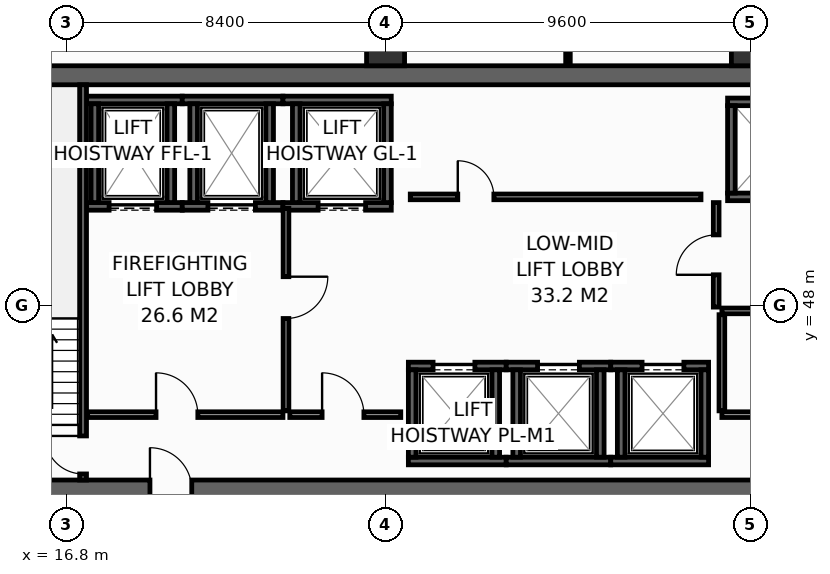
"""IFC4 building model, lengths in metres.
Left out: names, types, materials, properties, quantities, classifications, styles, units other than length and angle.
Written with IfcOpenShell. Run it as: python <this file> out.ifc"""

import sys

from ifc_helpers import new_model, si_unit, direction, frame, frame_2d, origin, origin_2d, place, context, subcontext, project, spatial, rectangle, hollow_rectangle, extrude, element, fill, save


model = new_model("IFC4")
c1 = context("Model", 3, precision=1e-05, world=origin(), true_north=direction((0.0, 1.0)))
c2 = subcontext(c1, "Body", "Model", "MODEL_VIEW")
j1 = project(units=[si_unit("LENGTHUNIT", "METRE"), si_unit("PLANEANGLEUNIT", "RADIAN")], contexts=[c1])
p1 = place(None, origin())
s1 = spatial("IfcSite", under=j1, at=p1, CompositionType="ELEMENT")
p2 = place(p1, origin())
s2 = spatial("IfcBuilding", under=s1, at=p2, CompositionType="ELEMENT")
p3 = place(p2, frame((0.0, 0.0, 129.6)))
s3 = spatial("IfcBuildingStorey", under=s2, at=p3, CompositionType="ELEMENT", Elevation=129.6)
p4 = place(p3, frame((13.6, 43.15, 0.0), z_axis=(0.0, 0.0, 1.0), x_axis=(1.0, 0.0, 0.0)))
e1 = element("IfcWall", 1, at=p4, inside=s3, PredefinedType="SHEAR", context=c2, shape_type="SweptSolid", body=[
    extrude(rectangle(XDim=32.7, YDim=0.5, at=frame_2d((16.35, 0.0))), origin(), (0.0, 0.0, 1.0), 3.55),
])
p5 = place(p4, frame((5.4, 0.0, 0.0)))
e2 = element("IfcOpeningElement", 2, at=p5, cuts=e1, PredefinedType="OPENING", context=c2, shape_type="SweptSolid", body=[
    extrude(rectangle(XDim=1.1, YDim=2.15, at=frame_2d((0.55, 1.075))), frame((0.0, 0.26, 0.0), z_axis=(0.0, -1.0, 0.0), x_axis=(1.0, 0.0, 0.0)), (0.0, 0.0, 1.0), 0.52),
])
p6 = place(p4, frame((25.6, 0.0, 0.0)))
e3 = element("IfcOpeningElement", 3, at=p6, cuts=e1, PredefinedType="OPENING", context=c2, shape_type="SweptSolid", body=[
    extrude(rectangle(XDim=1.1, YDim=2.15, at=frame_2d((0.55, 1.075))), frame((0.0, 0.26, 0.0), z_axis=(0.0, -1.0, 0.0), x_axis=(1.0, 0.0, 0.0)), (0.0, 0.0, 1.0), 0.52),
])
p7 = place(p3, frame((13.6, 54.05, 0.0), z_axis=(0.0, 0.0, 1.0), x_axis=(1.0, 0.0, 0.0)))
e4 = element("IfcWall", 4, at=p7, inside=s3, PredefinedType="SHEAR", context=c2, shape_type="SweptSolid", body=[
    extrude(rectangle(XDim=32.7, YDim=0.5, at=frame_2d((16.35, 0.0))), origin(), (0.0, 0.0, 1.0), 3.55),
])
for number, where, z_axis, x_axis in (
    (5, (25.2, 54.8, 0.0), (0.0, 0.0, 1.0), (1.0, 0.0, 0.0)),
    (6, (34.8, 54.8, 0.0), (0.0, 0.0, 1.0), (1.0, 0.0, 0.0)),
):
    element("IfcColumn", number, at=place(p3, frame(where, z_axis=z_axis, x_axis=x_axis)), inside=s3, PredefinedType="COLUMN", context=c2, shape_type="SweptSolid", body=[
        extrude(hollow_rectangle(XDim=1.0, YDim=1.0, WallThickness=0.045, at=origin_2d()), origin(), (0.0, 0.0, 1.0), 3.8),
    ])
p8 = place(p3, frame((17.33, 50.6, 0.0), z_axis=(0.0, 0.0, 1.0), x_axis=(1.0, 0.0, 0.0)))
e7 = element("IfcWall", 7, at=p8, inside=s3, PredefinedType="SHEAR", context=c2, shape_type="SweptSolid", body=[
    extrude(rectangle(XDim=2.52, YDim=0.2, at=frame_2d((1.26, 0.0))), origin(), (0.0, 0.0, 1.0), 3.55),
])
p9 = place(p8, frame((0.595, 0.0, 0.0)))
e8 = element("IfcOpeningElement", 8, at=p9, cuts=e7, PredefinedType="OPENING", context=c2, shape_type="SweptSolid", body=[
    extrude(rectangle(XDim=1.25, YDim=2.3, at=frame_2d((0.625, 1.15))), frame((0.0, 0.11, 0.0), z_axis=(0.0, -1.0, 0.0), x_axis=(1.0, 0.0, 0.0)), (0.0, 0.0, 1.0), 0.22),
])
p10 = place(p3, frame((17.33, 53.4, 0.0), z_axis=(0.0, 0.0, 1.0), x_axis=(1.0, 0.0, 0.0)))
e9 = element("IfcWall", 9, at=p10, inside=s3, PredefinedType="SHEAR", context=c2, shape_type="SweptSolid", body=[
    extrude(rectangle(XDim=2.52, YDim=0.2, at=frame_2d((1.26, 0.0))), origin(), (0.0, 0.0, 1.0), 3.55),
])
for number, where, z_axis, x_axis in (
    (10, (17.55, 50.7, 0.0), (0.0, 0.0, 1.0), (0.0, 1.0, 0.0)),
    (11, (19.55, 50.7, 0.0), (0.0, 0.0, 1.0), (0.0, 1.0, 0.0)),
):
    element("IfcWall", number, at=place(p3, frame(where, z_axis=z_axis, x_axis=x_axis)), inside=s3, PredefinedType="SHEAR", context=c2, shape_type="SweptSolid", body=[
        extrude(rectangle(XDim=2.6, YDim=0.2, at=frame_2d((1.3, 0.0))), origin(), (0.0, 0.0, 1.0), 3.55),
    ])
p11 = place(p3, frame((19.85, 50.6, 0.0), z_axis=(0.0, 0.0, 1.0), x_axis=(1.0, 0.0, 0.0)))
e12 = element("IfcWall", 12, at=p11, inside=s3, PredefinedType="SHEAR", context=c2, shape_type="SweptSolid", body=[
    extrude(rectangle(XDim=2.65, YDim=0.2, at=frame_2d((1.325, 0.0))), origin(), (0.0, 0.0, 1.0), 3.55),
])
p12 = place(p11, frame((0.675, 0.0, 0.0)))
e13 = element("IfcOpeningElement", 13, at=p12, cuts=e12, PredefinedType="OPENING", context=c2, shape_type="SweptSolid", body=[
    extrude(rectangle(XDim=1.25, YDim=2.3, at=frame_2d((0.625, 1.15))), frame((0.0, 0.11, 0.0), z_axis=(0.0, -1.0, 0.0), x_axis=(1.0, 0.0, 0.0)), (0.0, 0.0, 1.0), 0.22),
])
p13 = place(p3, frame((19.85, 53.4, 0.0), z_axis=(0.0, 0.0, 1.0), x_axis=(1.0, 0.0, 0.0)))
e14 = element("IfcWall", 14, at=p13, inside=s3, PredefinedType="SHEAR", context=c2, shape_type="SweptSolid", body=[
    extrude(rectangle(XDim=2.65, YDim=0.2, at=frame_2d((1.325, 0.0))), origin(), (0.0, 0.0, 1.0), 3.55),
])
for number, where, z_axis, x_axis in (
    (15, (20.15, 50.7, 0.0), (0.0, 0.0, 1.0), (0.0, 1.0, 0.0)),
    (16, (22.15, 50.7, 0.0), (0.0, 0.0, 1.0), (0.0, 1.0, 0.0)),
):
    element("IfcWall", number, at=place(p3, frame(where, z_axis=z_axis, x_axis=x_axis)), inside=s3, PredefinedType="SHEAR", context=c2, shape_type="SweptSolid", body=[
        extrude(rectangle(XDim=2.6, YDim=0.2, at=frame_2d((1.3, 0.0))), origin(), (0.0, 0.0, 1.0), 3.55),
    ])
p14 = place(p3, frame((22.5, 50.6, 0.0), z_axis=(0.0, 0.0, 1.0), x_axis=(1.0, 0.0, 0.0)))
e17 = element("IfcWall", 17, at=p14, inside=s3, PredefinedType="SHEAR", context=c2, shape_type="SweptSolid", body=[
    extrude(rectangle(XDim=2.85, YDim=0.2, at=frame_2d((1.425, 0.0))), origin(), (0.0, 0.0, 1.0), 3.55),
])
p15 = place(p14, frame((0.925, 0.0, 0.0)))
e18 = element("IfcOpeningElement", 18, at=p15, cuts=e17, PredefinedType="OPENING", context=c2, shape_type="SweptSolid", body=[
    extrude(rectangle(XDim=1.25, YDim=2.3, at=frame_2d((0.625, 1.15))), frame((0.0, 0.11, 0.0), z_axis=(0.0, -1.0, 0.0), x_axis=(1.0, 0.0, 0.0)), (0.0, 0.0, 1.0), 0.22),
])
p16 = place(p3, frame((22.5, 53.4, 0.0), z_axis=(0.0, 0.0, 1.0), x_axis=(1.0, 0.0, 0.0)))
e19 = element("IfcWall", 19, at=p16, inside=s3, PredefinedType="SHEAR", context=c2, shape_type="SweptSolid", body=[
    extrude(rectangle(XDim=2.85, YDim=0.2, at=frame_2d((1.425, 0.0))), origin(), (0.0, 0.0, 1.0), 3.55),
])
for number, where, z_axis, x_axis in (
    (20, (22.85, 50.7, 0.0), (0.0, 0.0, 1.0), (0.0, 1.0, 0.0)),
    (21, (25.25, 50.7, 0.0), (0.0, 0.0, 1.0), (0.0, 1.0, 0.0)),
):
    element("IfcWall", number, at=place(p3, frame(where, z_axis=z_axis, x_axis=x_axis)), inside=s3, PredefinedType="SHEAR", context=c2, shape_type="SweptSolid", body=[
        extrude(rectangle(XDim=2.6, YDim=0.2, at=frame_2d((1.3, 0.0))), origin(), (0.0, 0.0, 1.0), 3.55),
    ])
p17 = place(p3, frame((25.8, 43.9, 0.0), z_axis=(0.0, 0.0, 1.0), x_axis=(1.0, 0.0, 0.0)))
e22 = element("IfcWall", 22, at=p17, inside=s3, PredefinedType="SHEAR", context=c2, shape_type="SweptSolid", body=[
    extrude(rectangle(XDim=2.575, YDim=0.2, at=frame_2d((1.288, 0.0))), origin(), (0.0, 0.0, 1.0), 3.55),
])
p18 = place(p3, frame((25.8, 46.4, 0.0), z_axis=(0.0, 0.0, 1.0), x_axis=(1.0, 0.0, 0.0)))
e23 = element("IfcWall", 23, at=p18, inside=s3, PredefinedType="SHEAR", context=c2, shape_type="SweptSolid", body=[
    extrude(rectangle(XDim=2.575, YDim=0.2, at=frame_2d((1.288, 0.0))), origin(), (0.0, 0.0, 1.0), 3.55),
])
p19 = place(p18, frame((0.65, 0.0, 0.0)))
e24 = element("IfcOpeningElement", 24, at=p19, cuts=e23, PredefinedType="OPENING", context=c2, shape_type="SweptSolid", body=[
    extrude(rectangle(XDim=1.1, YDim=2.2, at=frame_2d((0.55, 1.1))), frame((0.0, 0.11, 0.0), z_axis=(0.0, -1.0, 0.0), x_axis=(1.0, 0.0, 0.0)), (0.0, 0.0, 1.0), 0.22),
])
for number, where, z_axis, x_axis in (
    (25, (25.9, 44.0, 0.0), (0.0, 0.0, 1.0), (0.0, 1.0, 0.0)),
    (26, (28.1, 44.0, 0.0), (0.0, 0.0, 1.0), (0.0, 1.0, 0.0)),
):
    element("IfcWall", number, at=place(p3, frame(where, z_axis=z_axis, x_axis=x_axis)), inside=s3, PredefinedType="SHEAR", context=c2, shape_type="SweptSolid", body=[
        extrude(rectangle(XDim=2.3, YDim=0.2, at=frame_2d((1.15, 0.0))), origin(), (0.0, 0.0, 1.0), 3.55),
    ])
p20 = place(p3, frame((28.375, 43.9, 0.0), z_axis=(0.0, 0.0, 1.0), x_axis=(1.0, 0.0, 0.0)))
e27 = element("IfcWall", 27, at=p20, inside=s3, PredefinedType="SHEAR", context=c2, shape_type="SweptSolid", body=[
    extrude(rectangle(XDim=2.75, YDim=0.2, at=frame_2d((1.375, 0.0))), origin(), (0.0, 0.0, 1.0), 3.55),
])
p21 = place(p3, frame((28.375, 46.4, 0.0), z_axis=(0.0, 0.0, 1.0), x_axis=(1.0, 0.0, 0.0)))
e28 = element("IfcWall", 28, at=p21, inside=s3, PredefinedType="SHEAR", context=c2, shape_type="SweptSolid", body=[
    extrude(rectangle(XDim=2.75, YDim=0.2, at=frame_2d((1.375, 0.0))), origin(), (0.0, 0.0, 1.0), 3.55),
])
p22 = place(p21, frame((0.825, 0.0, 0.0)))
e29 = element("IfcOpeningElement", 29, at=p22, cuts=e28, PredefinedType="OPENING", context=c2, shape_type="SweptSolid", body=[
    extrude(rectangle(XDim=1.1, YDim=2.2, at=frame_2d((0.55, 1.1))), frame((0.0, 0.11, 0.0), z_axis=(0.0, -1.0, 0.0), x_axis=(1.0, 0.0, 0.0)), (0.0, 0.0, 1.0), 0.22),
])
for number, where, z_axis, x_axis in (
    (30, (28.65, 44.0, 0.0), (0.0, 0.0, 1.0), (0.0, 1.0, 0.0)),
    (31, (30.85, 44.0, 0.0), (0.0, 0.0, 1.0), (0.0, 1.0, 0.0)),
):
    element("IfcWall", number, at=place(p3, frame(where, z_axis=z_axis, x_axis=x_axis)), inside=s3, PredefinedType="SHEAR", context=c2, shape_type="SweptSolid", body=[
        extrude(rectangle(XDim=2.3, YDim=0.2, at=frame_2d((1.15, 0.0))), origin(), (0.0, 0.0, 1.0), 3.55),
    ])
p23 = place(p3, frame((31.125, 43.9, 0.0), z_axis=(0.0, 0.0, 1.0), x_axis=(1.0, 0.0, 0.0)))
e32 = element("IfcWall", 32, at=p23, inside=s3, PredefinedType="SHEAR", context=c2, shape_type="SweptSolid", body=[
    extrude(rectangle(XDim=2.575, YDim=0.2, at=frame_2d((1.288, 0.0))), origin(), (0.0, 0.0, 1.0), 3.55),
])
p24 = place(p3, frame((31.125, 46.4, 0.0), z_axis=(0.0, 0.0, 1.0), x_axis=(1.0, 0.0, 0.0)))
e33 = element("IfcWall", 33, at=p24, inside=s3, PredefinedType="SHEAR", context=c2, shape_type="SweptSolid", body=[
    extrude(rectangle(XDim=2.575, YDim=0.2, at=frame_2d((1.288, 0.0))), origin(), (0.0, 0.0, 1.0), 3.55),
])
p25 = place(p24, frame((0.825, 0.0, 0.0)))
e34 = element("IfcOpeningElement", 34, at=p25, cuts=e33, PredefinedType="OPENING", context=c2, shape_type="SweptSolid", body=[
    extrude(rectangle(XDim=1.1, YDim=2.2, at=frame_2d((0.55, 1.1))), frame((0.0, 0.11, 0.0), z_axis=(0.0, -1.0, 0.0), x_axis=(1.0, 0.0, 0.0)), (0.0, 0.0, 1.0), 0.22),
])
for number, where, z_axis, x_axis in (
    (35, (31.4, 44.0, 0.0), (0.0, 0.0, 1.0), (0.0, 1.0, 0.0)),
    (36, (33.6, 44.0, 0.0), (0.0, 0.0, 1.0), (0.0, 1.0, 0.0)),
):
    element("IfcWall", number, at=place(p3, frame(where, z_axis=z_axis, x_axis=x_axis)), inside=s3, PredefinedType="SHEAR", context=c2, shape_type="SweptSolid", body=[
        extrude(rectangle(XDim=2.3, YDim=0.2, at=frame_2d((1.15, 0.0))), origin(), (0.0, 0.0, 1.0), 3.55),
    ])
for number, where, z_axis, x_axis in (
    (37, (34.2, 50.85, 0.0), (0.0, 0.0, 1.0), (1.0, 0.0, 0.0)),
    (38, (34.2, 53.35, 0.0), (0.0, 0.0, 1.0), (1.0, 0.0, 0.0)),
):
    element("IfcWall", number, at=place(p3, frame(where, z_axis=z_axis, x_axis=x_axis)), inside=s3, PredefinedType="SHEAR", context=c2, shape_type="SweptSolid", body=[
        extrude(rectangle(XDim=2.575, YDim=0.2, at=frame_2d((1.288, 0.0))), origin(), (0.0, 0.0, 1.0), 3.55),
    ])
p26 = place(p3, frame((34.3, 50.95, 0.0), z_axis=(0.0, 0.0, 1.0), x_axis=(0.0, 1.0, 0.0)))
e39 = element("IfcWall", 39, at=p26, inside=s3, PredefinedType="SHEAR", context=c2, shape_type="SweptSolid", body=[
    extrude(rectangle(XDim=2.3, YDim=0.2, at=frame_2d((1.15, 0.0))), origin(), (0.0, 0.0, 1.0), 3.55),
])
p27 = place(p3, frame((17.24, 43.4, 0.0), z_axis=(0.0, 0.0, 1.0), x_axis=(0.0, 1.0, 0.0)))
e40 = element("IfcWall", 40, at=p27, inside=s3, PredefinedType="SHEAR", context=c2, shape_type="SweptSolid", body=[
    extrude(rectangle(XDim=10.4, YDim=0.18, at=frame_2d((5.2, 0.0))), origin(), (0.0, 0.0, 1.0), 3.55),
])
p28 = place(p27, frame((0.16, 0.0, 0.0)))
e41 = element("IfcOpeningElement", 41, at=p28, cuts=e40, PredefinedType="OPENING", context=c2, shape_type="SweptSolid", body=[
    extrude(rectangle(XDim=1.0, YDim=2.15, at=frame_2d((0.5, 1.075))), frame((0.0, 0.1, 0.0), z_axis=(0.0, -1.0, 0.0), x_axis=(1.0, 0.0, 0.0)), (0.0, 0.0, 1.0), 0.2),
])
p29 = place(p3, frame((17.36, 45.12, 0.0), z_axis=(0.0, 0.0, 1.0), x_axis=(1.0, 0.0, 0.0)))
e42 = element("IfcWall", 42, at=p29, inside=s3, PredefinedType="PARTITIONING", context=c2, shape_type="SweptSolid", body=[
    extrude(rectangle(XDim=5.14, YDim=0.15, at=frame_2d((2.57, 0.0))), origin(), (0.0, 0.0, 1.0), 3.55),
])
p30 = place(p29, frame((1.8, 0.0, 0.0)))
e43 = element("IfcOpeningElement", 43, at=p30, cuts=e42, PredefinedType="OPENING", context=c2, shape_type="SweptSolid", body=[
    extrude(rectangle(XDim=1.1, YDim=2.15, at=frame_2d((0.55, 1.075))), frame((0.0, 0.085, 0.0), z_axis=(0.0, -1.0, 0.0), x_axis=(1.0, 0.0, 0.0)), (0.0, 0.0, 1.0), 0.17),
])
p31 = place(p3, frame((22.58, 50.55, 0.0), z_axis=(0.0, 0.0, 1.0), x_axis=(0.0, -1.0, 0.0)))
e44 = element("IfcWall", 44, at=p31, inside=s3, PredefinedType="PARTITIONING", context=c2, shape_type="SweptSolid", body=[
    extrude(rectangle(XDim=5.33, YDim=0.15, at=frame_2d((2.665, 0.0))), origin(), (0.0, 0.0, 1.0), 3.55),
])
p32 = place(p31, frame((1.8, 0.0, 0.0)))
e45 = element("IfcOpeningElement", 45, at=p32, cuts=e44, PredefinedType="OPENING", context=c2, shape_type="SweptSolid", body=[
    extrude(rectangle(XDim=1.1, YDim=2.15, at=frame_2d((0.55, 1.075))), frame((0.0, 0.085, 0.0), z_axis=(0.0, -1.0, 0.0), x_axis=(1.0, 0.0, 0.0)), (0.0, 0.0, 1.0), 0.17),
])
p33 = place(p3, frame((22.68, 45.12, 0.0), z_axis=(0.0, 0.0, 1.0), x_axis=(1.0, 0.0, 0.0)))
e46 = element("IfcWall", 46, at=p33, inside=s3, PredefinedType="PARTITIONING", context=c2, shape_type="SweptSolid", body=[
    extrude(rectangle(XDim=2.92, YDim=0.15, at=frame_2d((1.46, 0.0))), origin(), (0.0, 0.0, 1.0), 3.55),
])
p34 = place(p33, frame((0.85, 0.0, 0.0)))
e47 = element("IfcOpeningElement", 47, at=p34, cuts=e46, PredefinedType="OPENING", context=c2, shape_type="SweptSolid", body=[
    extrude(rectangle(XDim=1.1, YDim=2.15, at=frame_2d((0.55, 1.075))), frame((0.0, 0.085, 0.0), z_axis=(0.0, -1.0, 0.0), x_axis=(1.0, 0.0, 0.0)), (0.0, 0.0, 1.0), 0.17),
])
p35 = place(p3, frame((33.9, 47.95, 0.0), z_axis=(0.0, 0.0, 1.0), x_axis=(0.0, 1.0, 0.0)))
e48 = element("IfcWall", 48, at=p35, inside=s3, PredefinedType="PARTITIONING", context=c2, shape_type="SweptSolid", body=[
    extrude(rectangle(XDim=2.75, YDim=0.15, at=frame_2d((1.375, 0.0))), origin(), (0.0, 0.0, 1.0), 3.55),
])
p36 = place(p35, frame((0.85, 0.0, 0.0)))
e49 = element("IfcOpeningElement", 49, at=p36, cuts=e48, PredefinedType="OPENING", context=c2, shape_type="SweptSolid", body=[
    extrude(rectangle(XDim=1.05, YDim=2.15, at=frame_2d((0.525, 1.075))), frame((0.0, 0.085, 0.0), z_axis=(0.0, -1.0, 0.0), x_axis=(1.0, 0.0, 0.0)), (0.0, 0.0, 1.0), 0.17),
])
p37 = place(p3, frame((34.05, 45.12, 0.0), z_axis=(0.0, 0.0, 1.0), x_axis=(1.0, 0.0, 0.0)))
e50 = element("IfcWall", 50, at=p37, inside=s3, PredefinedType="PARTITIONING", context=c2, shape_type="SweptSolid", body=[
    extrude(rectangle(XDim=8.45, YDim=0.15, at=frame_2d((4.225, 0.0))), origin(), (0.0, 0.0, 1.0), 3.55),
])
p38 = place(p37, frame((1.5, 0.0, 0.0)))
e51 = element("IfcOpeningElement", 51, at=p38, cuts=e50, PredefinedType="OPENING", context=c2, shape_type="SweptSolid", body=[
    extrude(rectangle(XDim=0.95, YDim=2.15, at=frame_2d((0.475, 1.075))), frame((0.0, 0.085, 0.0), z_axis=(0.0, -1.0, 0.0), x_axis=(1.0, 0.0, 0.0)), (0.0, 0.0, 1.0), 0.17),
])
p39 = place(p37, frame((5.8, 0.0, 0.0)))
e52 = element("IfcOpeningElement", 52, at=p39, cuts=e50, PredefinedType="OPENING", context=c2, shape_type="SweptSolid", body=[
    extrude(rectangle(XDim=0.95, YDim=2.15, at=frame_2d((0.475, 1.075))), frame((0.0, 0.085, 0.0), z_axis=(0.0, -1.0, 0.0), x_axis=(1.0, 0.0, 0.0)), (0.0, 0.0, 1.0), 0.17),
])
p40 = place(p3, frame((34.05, 47.85, 0.0), z_axis=(0.0, 0.0, 1.0), x_axis=(1.0, 0.0, 0.0)))
e53 = element("IfcWall", 53, at=p40, inside=s3, PredefinedType="PARTITIONING", context=c2, shape_type="SweptSolid", body=[
    extrude(rectangle(XDim=8.45, YDim=0.15, at=frame_2d((4.225, 0.0))), origin(), (0.0, 0.0, 1.0), 3.55),
])
p41 = place(p3, frame((34.05, 45.22, 0.0), z_axis=(0.0, 0.0, 1.0), x_axis=(0.0, 1.0, 0.0)))
e54 = element("IfcWall", 54, at=p41, inside=s3, PredefinedType="PARTITIONING", context=c2, shape_type="SweptSolid", body=[
    extrude(rectangle(XDim=2.53, YDim=0.15, at=frame_2d((1.265, 0.0))), origin(), (0.0, 0.0, 1.0), 3.55),
])
p42 = place(p3, frame((25.85, 50.85, 0.0), z_axis=(0.0, 0.0, 1.0), x_axis=(1.0, 0.0, 0.0)))
e55 = element("IfcWall", 55, at=p42, inside=s3, PredefinedType="PARTITIONING", context=c2, shape_type="SweptSolid", body=[
    extrude(rectangle(XDim=7.65, YDim=0.15, at=frame_2d((3.825, 0.0))), origin(), (0.0, 0.0, 1.0), 3.55),
])
p43 = place(p42, frame((1.25, 0.0, 0.0)))
e56 = element("IfcOpeningElement", 56, at=p43, cuts=e55, PredefinedType="OPENING", context=c2, shape_type="SweptSolid", body=[
    extrude(rectangle(XDim=0.95, YDim=2.15, at=frame_2d((0.475, 1.075))), frame((0.0, 0.085, 0.0), z_axis=(0.0, -1.0, 0.0), x_axis=(1.0, 0.0, 0.0)), (0.0, 0.0, 1.0), 0.17),
])
p44 = place(p3, frame((30.0, 54.32, 0.0), z_axis=(0.0, 0.0, 1.0), x_axis=(0.0, 1.0, 0.0)))
e57 = element("IfcWall", 57, at=p44, inside=s3, PredefinedType="PARTITIONING", context=c2, shape_type="SweptSolid", body=[
    extrude(rectangle(XDim=1.675, YDim=0.12, at=frame_2d((0.837, 0.0))), origin(), (0.0, 0.0, 1.0), 2.935),
])
p45 = place(p9, origin())
e58 = element("IfcDoor", 58, at=p45, inside=s3, OperationType="SLIDING_TO_LEFT", PredefinedType="DOOR", context=c2, shape_type="SweptSolid", body=[
    extrude(rectangle(XDim=1.25, YDim=2.3, at=frame_2d((0.625, 1.15))), frame((0.0, 0.025, 0.0), z_axis=(0.0, -1.0, 0.0), x_axis=(1.0, 0.0, 0.0)), (0.0, 0.0, 1.0), 0.05),
])
fill(e8, e58)
p46 = place(p12, origin())
e59 = element("IfcDoor", 59, at=p46, inside=s3, OperationType="SLIDING_TO_LEFT", PredefinedType="DOOR", context=c2, shape_type="SweptSolid", body=[
    extrude(rectangle(XDim=1.25, YDim=2.3, at=frame_2d((0.625, 1.15))), frame((0.0, 0.025, 0.0), z_axis=(0.0, -1.0, 0.0), x_axis=(1.0, 0.0, 0.0)), (0.0, 0.0, 1.0), 0.05),
])
fill(e13, e59)
p47 = place(p15, origin())
e60 = element("IfcDoor", 60, at=p47, inside=s3, OperationType="SLIDING_TO_LEFT", PredefinedType="DOOR", context=c2, shape_type="SweptSolid", body=[
    extrude(rectangle(XDim=1.25, YDim=2.3, at=frame_2d((0.625, 1.15))), frame((0.0, 0.025, 0.0), z_axis=(0.0, -1.0, 0.0), x_axis=(1.0, 0.0, 0.0)), (0.0, 0.0, 1.0), 0.05),
])
fill(e18, e60)
p48 = place(p19, origin())
e61 = element("IfcDoor", 61, at=p48, inside=s3, OperationType="SLIDING_TO_LEFT", PredefinedType="DOOR", context=c2, shape_type="SweptSolid", body=[
    extrude(rectangle(XDim=1.1, YDim=2.2, at=frame_2d((0.55, 1.1))), frame((0.0, 0.025, 0.0), z_axis=(0.0, -1.0, 0.0), x_axis=(1.0, 0.0, 0.0)), (0.0, 0.0, 1.0), 0.05),
])
fill(e24, e61)
p49 = place(p22, origin())
e62 = element("IfcDoor", 62, at=p49, inside=s3, OperationType="SLIDING_TO_LEFT", PredefinedType="DOOR", context=c2, shape_type="SweptSolid", body=[
    extrude(rectangle(XDim=1.1, YDim=2.2, at=frame_2d((0.55, 1.1))), frame((0.0, 0.025, 0.0), z_axis=(0.0, -1.0, 0.0), x_axis=(1.0, 0.0, 0.0)), (0.0, 0.0, 1.0), 0.05),
])
fill(e29, e62)
p50 = place(p25, origin())
e63 = element("IfcDoor", 63, at=p50, inside=s3, OperationType="SLIDING_TO_LEFT", PredefinedType="DOOR", context=c2, shape_type="SweptSolid", body=[
    extrude(rectangle(XDim=1.1, YDim=2.2, at=frame_2d((0.55, 1.1))), frame((0.0, 0.025, 0.0), z_axis=(0.0, -1.0, 0.0), x_axis=(1.0, 0.0, 0.0)), (0.0, 0.0, 1.0), 0.05),
])
fill(e34, e63)
p51 = place(p28, origin())
e64 = element("IfcDoor", 64, at=p51, inside=s3, OperationType="SINGLE_SWING_RIGHT", PredefinedType="DOOR", context=c2, shape_type="SweptSolid", body=[
    extrude(rectangle(XDim=1.0, YDim=2.15, at=frame_2d((0.5, 1.075))), frame((0.0, 0.025, 0.0), z_axis=(0.0, -1.0, 0.0), x_axis=(1.0, 0.0, 0.0)), (0.0, 0.0, 1.0), 0.05),
])
fill(e41, e64)
p52 = place(p30, origin())
e65 = element("IfcDoor", 65, at=p52, inside=s3, OperationType="SINGLE_SWING_LEFT", PredefinedType="DOOR", context=c2, shape_type="SweptSolid", body=[
    extrude(rectangle(XDim=1.1, YDim=2.15, at=frame_2d((0.55, 1.075))), frame((0.0, 0.025, 0.0), z_axis=(0.0, -1.0, 0.0), x_axis=(1.0, 0.0, 0.0)), (0.0, 0.0, 1.0), 0.05),
])
fill(e43, e65)
p53 = place(p32, origin())
e66 = element("IfcDoor", 66, at=p53, inside=s3, OperationType="SINGLE_SWING_LEFT", PredefinedType="DOOR", context=c2, shape_type="SweptSolid", body=[
    extrude(rectangle(XDim=1.1, YDim=2.15, at=frame_2d((0.55, 1.075))), frame((0.0, 0.025, 0.0), z_axis=(0.0, -1.0, 0.0), x_axis=(1.0, 0.0, 0.0)), (0.0, 0.0, 1.0), 0.05),
])
fill(e45, e66)
p54 = place(p34, origin())
e67 = element("IfcDoor", 67, at=p54, inside=s3, OperationType="SINGLE_SWING_LEFT", PredefinedType="DOOR", context=c2, shape_type="SweptSolid", body=[
    extrude(rectangle(XDim=1.1, YDim=2.15, at=frame_2d((0.55, 1.075))), frame((0.0, 0.025, 0.0), z_axis=(0.0, -1.0, 0.0), x_axis=(1.0, 0.0, 0.0)), (0.0, 0.0, 1.0), 0.05),
])
fill(e47, e67)
p55 = place(p5, origin())
e68 = element("IfcDoor", 68, at=p55, inside=s3, OperationType="SINGLE_SWING_LEFT", PredefinedType="DOOR", context=c2, shape_type="SweptSolid", body=[
    extrude(rectangle(XDim=1.1, YDim=2.15, at=frame_2d((0.55, 1.075))), frame((0.0, 0.025, 0.0), z_axis=(0.0, -1.0, 0.0), x_axis=(1.0, 0.0, 0.0)), (0.0, 0.0, 1.0), 0.05),
])
fill(e2, e68)
p56 = place(p36, origin())
e69 = element("IfcDoor", 69, at=p56, inside=s3, OperationType="SINGLE_SWING_LEFT", PredefinedType="DOOR", context=c2, shape_type="SweptSolid", body=[
    extrude(rectangle(XDim=1.05, YDim=2.15, at=frame_2d((0.525, 1.075))), frame((0.0, 0.025, 0.0), z_axis=(0.0, -1.0, 0.0), x_axis=(1.0, 0.0, 0.0)), (0.0, 0.0, 1.0), 0.05),
])
fill(e49, e69)
p57 = place(p43, origin())
e70 = element("IfcDoor", 70, at=p57, inside=s3, OperationType="SINGLE_SWING_LEFT", PredefinedType="DOOR", context=c2, shape_type="SweptSolid", body=[
    extrude(rectangle(XDim=0.95, YDim=2.15, at=frame_2d((0.475, 1.075))), frame((0.0, 0.025, 0.0), z_axis=(0.0, -1.0, 0.0), x_axis=(1.0, 0.0, 0.0)), (0.0, 0.0, 1.0), 0.05),
])
fill(e56, e70)
save(model, sys.argv[1])
